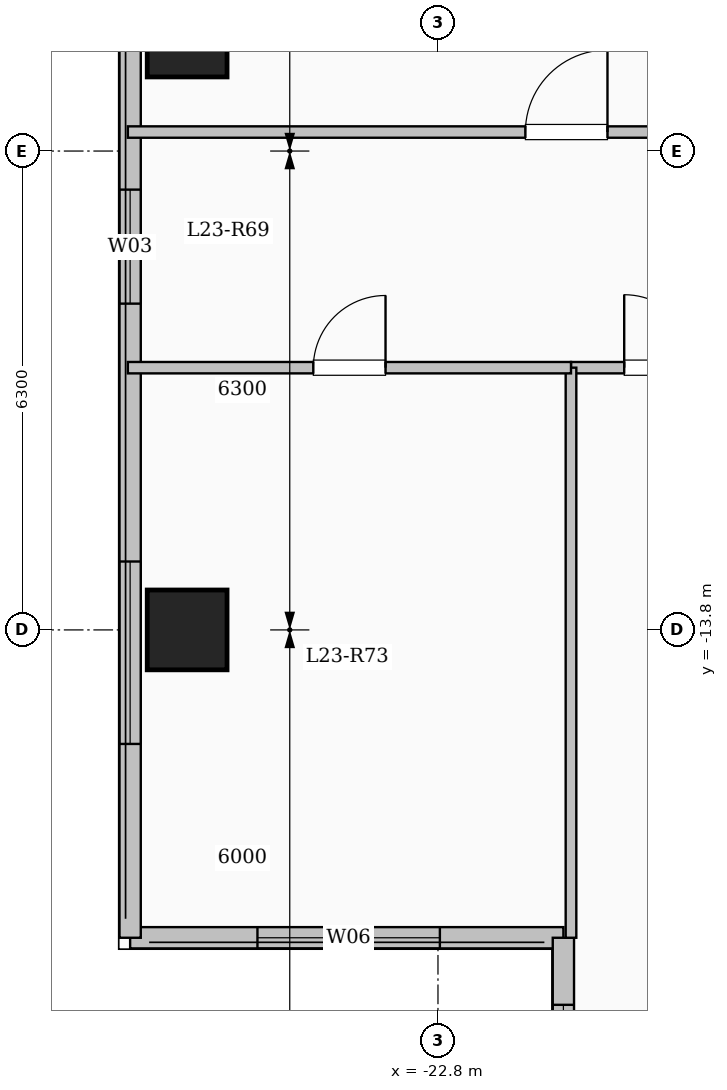
"""IFC4 building model, lengths in metres.
Left out: names, types, materials, properties, quantities, classifications, styles, units other than length and angle.
Written with IfcOpenShell. Run it as: python <this file> out.ifc"""

import sys

from ifc_helpers import new_model, si_unit, direction, frame, frame_2d, origin, origin_2d, place, context, subcontext, project, spatial, rectangle, extrude, element, fill, save


model = new_model("IFC4")
c1 = context("Model", 3, precision=1e-05, world=origin(), true_north=direction((0.0, 1.0)))
c2 = subcontext(c1, "Body", "Model", "MODEL_VIEW")
j1 = project(units=[si_unit("LENGTHUNIT", "METRE"), si_unit("PLANEANGLEUNIT", "RADIAN")], contexts=[c1])
p1 = place(None, origin())
s1 = spatial("IfcSite", under=j1, at=p1, CompositionType="ELEMENT")
p2 = place(p1, origin())
s2 = spatial("IfcBuilding", under=s1, at=p2, CompositionType="ELEMENT")
p3 = place(p2, frame((0.0, 0.0, 88.35)))
s3 = spatial("IfcBuildingStorey", under=s2, at=p3, CompositionType="ELEMENT", Elevation=88.35)
for number, where, z_axis, x_axis in (
    (1, (-26.1, -13.8, 0.0), (0.0, 0.0, 1.0), (1.0, 0.0, 0.0)),
    (2, (-26.1, -6.0, 0.0), (0.0, 0.0, 1.0), (1.0, 0.0, 0.0)),
):
    element("IfcColumn", number, at=place(p3, frame(where, z_axis=z_axis, x_axis=x_axis)), inside=s3, PredefinedType="COLUMN", context=c2, shape_type="SweptSolid", body=[
        extrude(rectangle(XDim=1.05, YDim=1.05, at=origin_2d()), origin(), (0.0, 0.0, 1.0), 3.35),
    ])
p4 = place(p3, frame((-21.15, -17.85, 0.0), z_axis=(0.0, 0.0, 1.0), x_axis=(-1.0, 0.0, 0.0)))
e3 = element("IfcWall", 3, at=p4, inside=s3, PredefinedType="SOLIDWALL", context=c2, shape_type="SweptSolid", body=[
    extrude(rectangle(XDim=5.7, YDim=0.28, at=frame_2d((2.85, 0.0))), origin(), (0.0, 0.0, 1.0), 3.1),
])
p5 = place(p4, frame((1.625, 0.0, 0.9)))
e4 = element("IfcOpeningElement", 4, at=p5, cuts=e3, PredefinedType="OPENING", context=c2, shape_type="SweptSolid", body=[
    extrude(rectangle(XDim=2.4, YDim=1.8, at=frame_2d((1.2, 0.9))), frame((0.0, 0.15, 0.0), z_axis=(0.0, -1.0, 0.0), x_axis=(1.0, 0.0, 0.0)), (0.0, 0.0, 1.0), 0.3),
])
p6 = place(p3, frame((-26.85, -17.85, 0.0), z_axis=(0.0, 0.0, 1.0), x_axis=(0.0, 1.0, 0.0)))
e5 = element("IfcWall", 5, at=p6, inside=s3, PredefinedType="SOLIDWALL", context=c2, shape_type="SweptSolid", body=[
    extrude(rectangle(XDim=35.7, YDim=0.28, at=frame_2d((17.85, 0.0))), origin(), (0.0, 0.0, 1.0), 3.1),
])
p7 = place(p6, frame((2.55, 0.0, 0.9)))
e6 = element("IfcOpeningElement", 6, at=p7, cuts=e5, PredefinedType="OPENING", context=c2, shape_type="SweptSolid", body=[
    extrude(rectangle(XDim=2.4, YDim=1.8, at=frame_2d((1.2, 0.9))), frame((0.0, 0.15, 0.0), z_axis=(0.0, -1.0, 0.0), x_axis=(1.0, 0.0, 0.0)), (0.0, 0.0, 1.0), 0.3),
])
p8 = place(p6, frame((8.343, 0.0, 0.9)))
e7 = element("IfcOpeningElement", 7, at=p8, cuts=e5, PredefinedType="OPENING", context=c2, shape_type="SweptSolid", body=[
    extrude(rectangle(XDim=1.5, YDim=1.65, at=frame_2d((0.75, 0.825))), frame((0.0, 0.15, 0.0), z_axis=(0.0, -1.0, 0.0), x_axis=(1.0, 0.0, 0.0)), (0.0, 0.0, 1.0), 0.3),
])
p9 = place(p6, frame((18.6, 0.0, 0.9)))
e8 = element("IfcOpeningElement", 8, at=p9, cuts=e5, PredefinedType="OPENING", context=c2, shape_type="SweptSolid", body=[
    extrude(rectangle(XDim=2.0, YDim=1.7, at=frame_2d((1.0, 0.85))), frame((0.0, 0.15, 0.0), z_axis=(0.0, -1.0, 0.0), x_axis=(1.0, 0.0, 0.0)), (0.0, 0.0, 1.0), 0.3),
])
p10 = place(p6, frame((28.975, 0.0, 0.95)))
e9 = element("IfcOpeningElement", 9, at=p10, cuts=e5, PredefinedType="OPENING", context=c2, shape_type="SweptSolid", body=[
    extrude(rectangle(XDim=1.0, YDim=1.5, at=frame_2d((0.5, 0.75))), frame((0.0, 0.15, 0.0), z_axis=(0.0, -1.0, 0.0), x_axis=(1.0, 0.0, 0.0)), (0.0, 0.0, 1.0), 0.3),
])
p11 = place(p6, frame((32.025, 0.0, 0.9)))
e10 = element("IfcOpeningElement", 10, at=p11, cuts=e5, PredefinedType="OPENING", context=c2, shape_type="SweptSolid", body=[
    extrude(rectangle(XDim=2.0, YDim=1.7, at=frame_2d((1.0, 0.85))), frame((0.0, 0.15, 0.0), z_axis=(0.0, -1.0, 0.0), x_axis=(1.0, 0.0, 0.0)), (0.0, 0.0, 1.0), 0.3),
])
p12 = place(p3, frame((-21.15, -22.05, 0.0), z_axis=(0.0, 0.0, 1.0), x_axis=(0.0, 1.0, 0.0)))
e11 = element("IfcWall", 11, at=p12, inside=s3, PredefinedType="SOLIDWALL", context=c2, shape_type="SweptSolid", body=[
    extrude(rectangle(XDim=4.2, YDim=0.28, at=frame_2d((2.1, 0.0))), origin(), (0.0, 0.0, 1.0), 3.1),
])
p13 = place(p12, frame((0.918, 0.0, 0.9)))
e12 = element("IfcOpeningElement", 12, at=p13, cuts=e11, PredefinedType="OPENING", context=c2, shape_type="SweptSolid", body=[
    extrude(rectangle(XDim=2.4, YDim=1.8, at=frame_2d((1.2, 0.9))), frame((0.0, 0.15, 0.0), z_axis=(0.0, -1.0, 0.0), x_axis=(1.0, 0.0, 0.0)), (0.0, 0.0, 1.0), 0.3),
])
p14 = place(p3, frame((-21.05, -10.35, 0.0), z_axis=(0.0, 0.0, 1.0), x_axis=(1.0, 0.0, 0.0)))
e13 = element("IfcWall", 13, at=p14, inside=s3, PredefinedType="PARTITIONING", context=c2, shape_type="SweptSolid", body=[
    extrude(rectangle(XDim=12.5, YDim=0.15, at=frame_2d((6.25, 0.0))), origin(), (0.0, 0.0, 1.0), 3.1),
])
p15 = place(p14, frame((0.7, 0.0, 0.0)))
e14 = element("IfcOpeningElement", 14, at=p15, cuts=e13, PredefinedType="OPENING", context=c2, shape_type="SweptSolid", body=[
    extrude(rectangle(XDim=0.96, YDim=2.15, at=frame_2d((0.48, 1.075))), frame((0.0, 0.085, 0.0), z_axis=(0.0, -1.0, 0.0), x_axis=(1.0, 0.0, 0.0)), (0.0, 0.0, 1.0), 0.17),
])
p16 = place(p3, frame((-26.88, -7.25, 0.0), z_axis=(0.0, 0.0, 1.0), x_axis=(1.0, 0.0, 0.0)))
e15 = element("IfcWall", 15, at=p16, inside=s3, PredefinedType="PARTITIONING", context=c2, shape_type="SweptSolid", body=[
    extrude(rectangle(XDim=8.43, YDim=0.15, at=frame_2d((4.215, 0.0))), origin(), (0.0, 0.0, 1.0), 3.1),
])
p17 = place(p16, frame((5.23, 0.0, 0.0)))
e16 = element("IfcOpeningElement", 16, at=p17, cuts=e15, PredefinedType="OPENING", context=c2, shape_type="SweptSolid", body=[
    extrude(rectangle(XDim=1.08, YDim=2.15, at=frame_2d((0.54, 1.075))), frame((0.0, 0.085, 0.0), z_axis=(0.0, -1.0, 0.0), x_axis=(1.0, 0.0, 0.0)), (0.0, 0.0, 1.0), 0.17),
])
p18 = place(p3, frame((-21.05, -17.85, 0.0), z_axis=(0.0, 0.0, 1.0), x_axis=(0.0, 1.0, 0.0)))
e17 = element("IfcWall", 17, at=p18, inside=s3, PredefinedType="PARTITIONING", context=c2, shape_type="SweptSolid", body=[
    extrude(rectangle(XDim=7.5, YDim=0.14, at=frame_2d((3.75, 0.0))), origin(), (0.0, 0.0, 1.0), 3.1),
])
p19 = place(p3, frame((-26.88, -10.35, 0.0), z_axis=(0.0, 0.0, 1.0), x_axis=(1.0, 0.0, 0.0)))
e18 = element("IfcWall", 18, at=p19, inside=s3, PredefinedType="PARTITIONING", context=c2, shape_type="SweptSolid", body=[
    extrude(rectangle(XDim=5.83, YDim=0.15, at=frame_2d((2.915, 0.0))), origin(), (0.0, 0.0, 1.0), 3.1),
])
p20 = place(p19, frame((2.44, 0.0, 0.0)))
e19 = element("IfcOpeningElement", 19, at=p20, cuts=e18, PredefinedType="OPENING", context=c2, shape_type="SweptSolid", body=[
    extrude(rectangle(XDim=0.95, YDim=2.15, at=frame_2d((0.475, 1.075))), frame((0.0, 0.085, 0.0), z_axis=(0.0, -1.0, 0.0), x_axis=(1.0, 0.0, 0.0)), (0.0, 0.0, 1.0), 0.17),
])
p21 = place(p5, origin())
e20 = element("IfcWindow", 20, at=p21, inside=s3, PartitioningType="SINGLE_PANEL", PredefinedType="WINDOW", context=c2, shape_type="SweptSolid", body=[
    extrude(rectangle(XDim=2.4, YDim=1.8, at=frame_2d((1.2, 0.9))), frame((0.0, 0.03, 0.0), z_axis=(0.0, -1.0, 0.0), x_axis=(1.0, 0.0, 0.0)), (0.0, 0.0, 1.0), 0.06),
])
fill(e4, e20)
p22 = place(p7, origin())
e21 = element("IfcWindow", 21, at=p22, inside=s3, PartitioningType="SINGLE_PANEL", PredefinedType="WINDOW", context=c2, shape_type="SweptSolid", body=[
    extrude(rectangle(XDim=2.4, YDim=1.8, at=frame_2d((1.2, 0.9))), frame((0.0, 0.03, 0.0), z_axis=(0.0, -1.0, 0.0), x_axis=(1.0, 0.0, 0.0)), (0.0, 0.0, 1.0), 0.06),
])
fill(e6, e21)
p23 = place(p8, origin())
e22 = element("IfcWindow", 22, at=p23, inside=s3, PartitioningType="SINGLE_PANEL", PredefinedType="WINDOW", context=c2, shape_type="SweptSolid", body=[
    extrude(rectangle(XDim=1.5, YDim=1.65, at=frame_2d((0.75, 0.825))), frame((0.0, 0.03, 0.0), z_axis=(0.0, -1.0, 0.0), x_axis=(1.0, 0.0, 0.0)), (0.0, 0.0, 1.0), 0.06),
])
fill(e7, e22)
p24 = place(p13, origin())
e23 = element("IfcWindow", 23, at=p24, inside=s3, PartitioningType="SINGLE_PANEL", PredefinedType="WINDOW", context=c2, shape_type="SweptSolid", body=[
    extrude(rectangle(XDim=2.4, YDim=1.8, at=frame_2d((1.2, 0.9))), frame((0.0, 0.03, 0.0), z_axis=(0.0, -1.0, 0.0), x_axis=(1.0, 0.0, 0.0)), (0.0, 0.0, 1.0), 0.06),
])
fill(e12, e23)
p25 = place(p15, origin())
e24 = element("IfcDoor", 24, at=p25, inside=s3, OperationType="SINGLE_SWING_LEFT", PredefinedType="DOOR", context=c2, shape_type="SweptSolid", body=[
    extrude(rectangle(XDim=0.96, YDim=2.15, at=frame_2d((0.48, 1.075))), frame((0.0, 0.025, 0.0), z_axis=(0.0, -1.0, 0.0), x_axis=(1.0, 0.0, 0.0)), (0.0, 0.0, 1.0), 0.05),
])
fill(e14, e24)
p26 = place(p20, origin())
e25 = element("IfcDoor", 25, at=p26, inside=s3, OperationType="SINGLE_SWING_RIGHT", PredefinedType="DOOR", context=c2, shape_type="SweptSolid", body=[
    extrude(rectangle(XDim=0.95, YDim=2.15, at=frame_2d((0.475, 1.075))), frame((0.0, 0.025, 0.0), z_axis=(0.0, -1.0, 0.0), x_axis=(1.0, 0.0, 0.0)), (0.0, 0.0, 1.0), 0.05),
])
fill(e19, e25)
p27 = place(p17, origin())
e26 = element("IfcDoor", 26, at=p27, inside=s3, OperationType="SINGLE_SWING_RIGHT", PredefinedType="DOOR", context=c2, shape_type="SweptSolid", body=[
    extrude(rectangle(XDim=1.08, YDim=2.15, at=frame_2d((0.54, 1.075))), frame((0.0, 0.025, 0.0), z_axis=(0.0, -1.0, 0.0), x_axis=(1.0, 0.0, 0.0)), (0.0, 0.0, 1.0), 0.05),
])
fill(e16, e26)
save(model, sys.argv[1])
